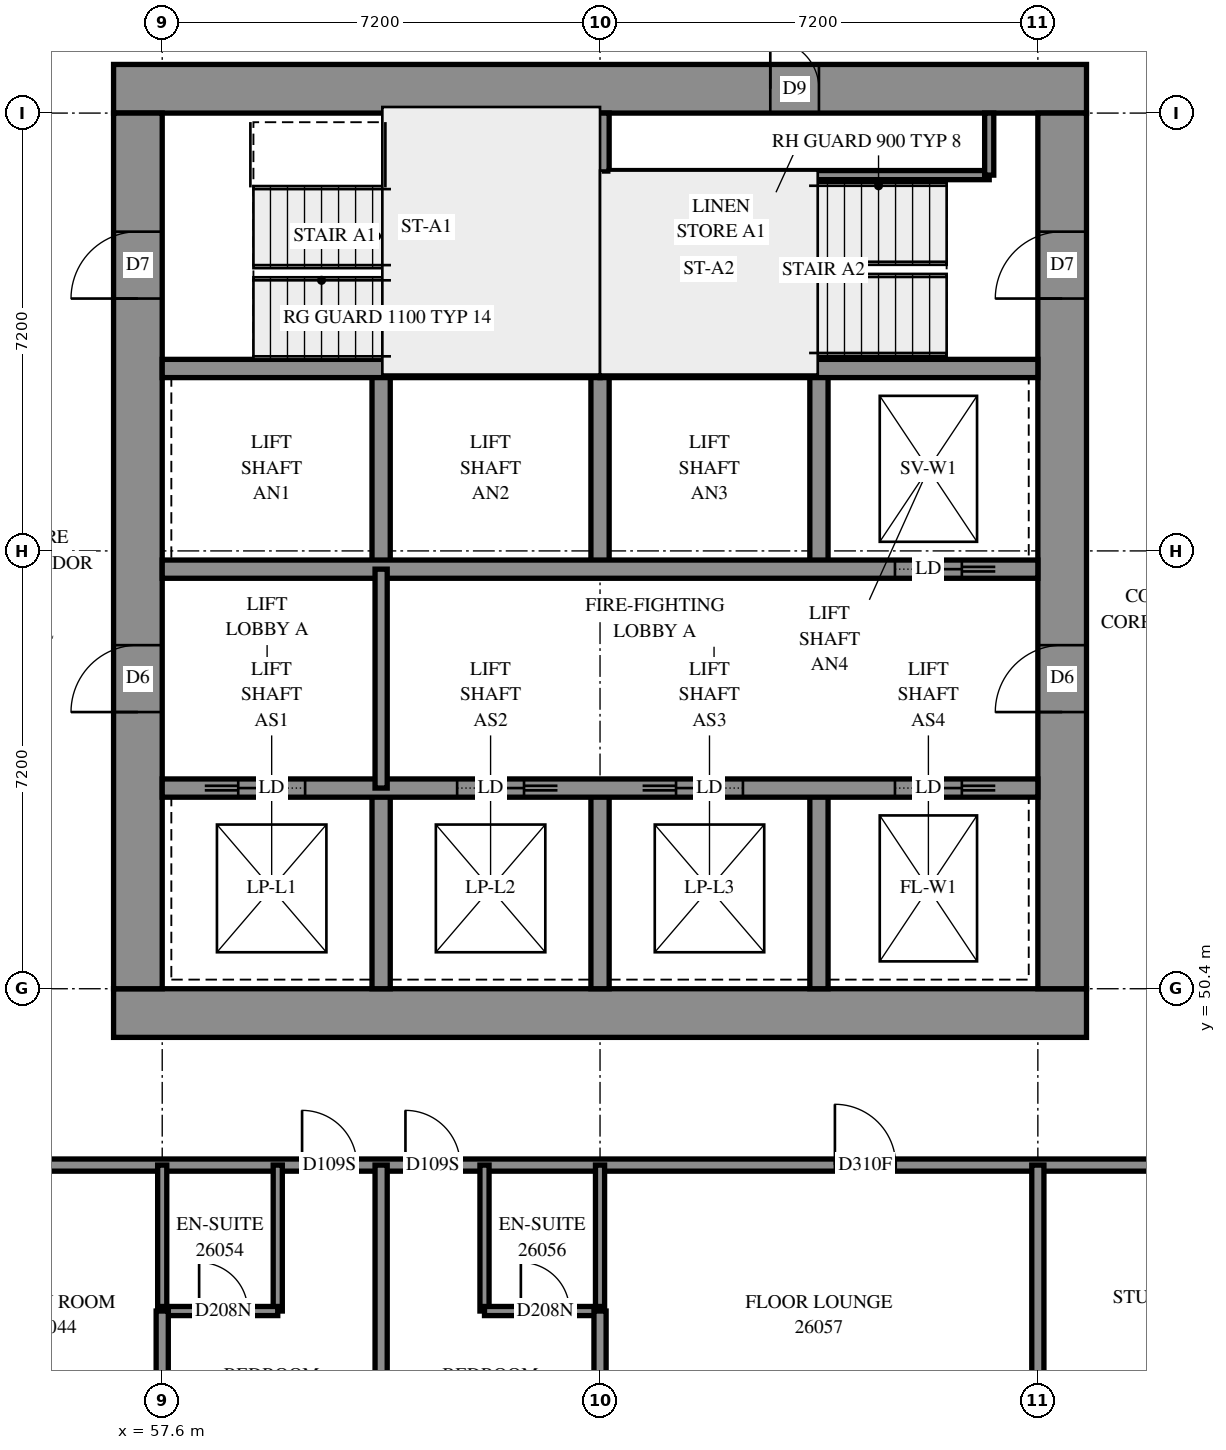
"""IFC4 building model, lengths in metres.
Left out: names, types, materials, properties, quantities, classifications, styles, units other than length and angle.
Written with IfcOpenShell. Run it as: python <this file> out.ifc"""

import sys

from ifc_helpers import new_model, si_unit, direction, frame, frame_2d, origin, place, context, subcontext, project, spatial, rectangle, extrude, element, fill, save


model = new_model("IFC4")
c1 = context("Model", 3, precision=1e-05, world=origin(), true_north=direction((0.0, 1.0)))
c2 = subcontext(c1, "Body", "Model", "MODEL_VIEW")
j1 = project(units=[si_unit("LENGTHUNIT", "METRE"), si_unit("PLANEANGLEUNIT", "RADIAN")], contexts=[c1])
p1 = place(None, origin())
s1 = spatial("IfcSite", under=j1, at=p1, CompositionType="ELEMENT")
p2 = place(p1, origin())
s2 = spatial("IfcBuilding", under=s1, at=p2, CompositionType="ELEMENT")
p3 = place(p2, frame((0.0, 0.0, 98.2)))
s3 = spatial("IfcBuildingStorey", under=s2, at=p3, CompositionType="ELEMENT", Elevation=98.2)
p4 = place(p3, frame((56.8, 50.0, -0.3), z_axis=(0.0, 0.0, 1.0), x_axis=(1.0, 0.0, 0.0)))
e1 = element("IfcWall", 1, at=p4, inside=s3, PredefinedType="SHEAR", context=c2, shape_type="SweptSolid", body=[
    extrude(rectangle(XDim=16.0, YDim=0.8, at=frame_2d((8.0, 0.0))), origin(), (0.0, 0.0, 1.0), 2.7),
])
p5 = place(p3, frame((56.8, 65.2, -0.3), z_axis=(0.0, 0.0, 1.0), x_axis=(1.0, 0.0, 0.0)))
e2 = element("IfcWall", 2, at=p5, inside=s3, PredefinedType="SHEAR", context=c2, shape_type="SweptSolid", body=[
    extrude(rectangle(XDim=16.0, YDim=0.8, at=frame_2d((8.0, 0.0))), origin(), (0.0, 0.0, 1.0), 2.7),
])
p6 = place(p5, frame((10.8, 0.0, 0.3)))
e3 = element("IfcOpeningElement", 3, at=p6, cuts=e2, PredefinedType="OPENING", context=c2, shape_type="SweptSolid", body=[
    extrude(rectangle(XDim=0.8, YDim=2.1, at=frame_2d((0.4, 1.05))), frame((0.0, 0.41, 0.0), z_axis=(0.0, -1.0, 0.0), x_axis=(1.0, 0.0, 0.0)), (0.0, 0.0, 1.0), 0.82),
])
p7 = place(p3, frame((57.2, 50.4, -0.3), z_axis=(0.0, 0.0, 1.0), x_axis=(0.0, 1.0, 0.0)))
e4 = element("IfcWall", 4, at=p7, inside=s3, PredefinedType="SHEAR", context=c2, shape_type="SweptSolid", body=[
    extrude(rectangle(XDim=14.4, YDim=0.8, at=frame_2d((7.2, 0.0))), origin(), (0.0, 0.0, 1.0), 2.7),
])
p8 = place(p7, frame((4.55, 0.0, 0.3)))
e5 = element("IfcOpeningElement", 5, at=p8, cuts=e4, PredefinedType="OPENING", context=c2, shape_type="SweptSolid", body=[
    extrude(rectangle(XDim=1.1, YDim=2.1, at=frame_2d((0.55, 1.05))), frame((0.0, 0.41, 0.0), z_axis=(0.0, -1.0, 0.0), x_axis=(1.0, 0.0, 0.0)), (0.0, 0.0, 1.0), 0.82),
])
p9 = place(p7, frame((11.35, 0.0, 0.3)))
e6 = element("IfcOpeningElement", 6, at=p9, cuts=e4, PredefinedType="OPENING", context=c2, shape_type="SweptSolid", body=[
    extrude(rectangle(XDim=1.1, YDim=2.1, at=frame_2d((0.55, 1.05))), frame((0.0, 0.41, 0.0), z_axis=(0.0, -1.0, 0.0), x_axis=(1.0, 0.0, 0.0)), (0.0, 0.0, 1.0), 0.82),
])
p10 = place(p3, frame((72.4, 50.4, -0.3), z_axis=(0.0, 0.0, 1.0), x_axis=(0.0, 1.0, 0.0)))
e7 = element("IfcWall", 7, at=p10, inside=s3, PredefinedType="SHEAR", context=c2, shape_type="SweptSolid", body=[
    extrude(rectangle(XDim=14.4, YDim=0.8, at=frame_2d((7.2, 0.0))), origin(), (0.0, 0.0, 1.0), 2.7),
])
p11 = place(p10, frame((4.55, 0.0, 0.3)))
e8 = element("IfcOpeningElement", 8, at=p11, cuts=e7, PredefinedType="OPENING", context=c2, shape_type="SweptSolid", body=[
    extrude(rectangle(XDim=1.1, YDim=2.1, at=frame_2d((0.55, 1.05))), frame((0.0, 0.41, 0.0), z_axis=(0.0, -1.0, 0.0), x_axis=(1.0, 0.0, 0.0)), (0.0, 0.0, 1.0), 0.82),
])
p12 = place(p10, frame((11.35, 0.0, 0.3)))
e9 = element("IfcOpeningElement", 9, at=p12, cuts=e7, PredefinedType="OPENING", context=c2, shape_type="SweptSolid", body=[
    extrude(rectangle(XDim=1.1, YDim=2.1, at=frame_2d((0.55, 1.05))), frame((0.0, 0.41, 0.0), z_axis=(0.0, -1.0, 0.0), x_axis=(1.0, 0.0, 0.0)), (0.0, 0.0, 1.0), 0.82),
])
for number, where, z_axis, x_axis in (
    (10, (61.2, 50.4, 0.0), (0.0, 0.0, 1.0), (0.0, 1.0, 0.0)),
    (11, (61.2, 57.3, 0.0), (0.0, 0.0, 1.0), (0.0, 1.0, 0.0)),
    (12, (64.8, 50.4, 0.0), (0.0, 0.0, 1.0), (0.0, 1.0, 0.0)),
    (13, (64.8, 57.3, 0.0), (0.0, 0.0, 1.0), (0.0, 1.0, 0.0)),
    (14, (68.4, 50.4, 0.0), (0.0, 0.0, 1.0), (0.0, 1.0, 0.0)),
    (15, (68.4, 57.3, 0.0), (0.0, 0.0, 1.0), (0.0, 1.0, 0.0)),
):
    element("IfcWall", number, at=place(p3, frame(where, z_axis=z_axis, x_axis=x_axis)), inside=s3, PredefinedType="SOLIDWALL", context=c2, shape_type="SweptSolid", body=[
        extrude(rectangle(XDim=3.3, YDim=0.3, at=frame_2d((1.65, 0.0))), origin(), (0.0, 0.0, 1.0), 3.1),
    ])
p13 = place(p3, frame((57.6, 53.7, 0.0), z_axis=(0.0, 0.0, 1.0), x_axis=(1.0, 0.0, 0.0)))
e16 = element("IfcWall", 16, at=p13, inside=s3, PredefinedType="SOLIDWALL", context=c2, shape_type="SweptSolid", body=[
    extrude(rectangle(XDim=14.4, YDim=0.3, at=frame_2d((7.2, 0.0))), origin(), (0.0, 0.0, 1.0), 3.1),
])
p14 = place(p13, frame((1.25, 0.0, 0.0)))
e17 = element("IfcOpeningElement", 17, at=p14, cuts=e16, PredefinedType="OPENING", context=c2, shape_type="SweptSolid", body=[
    extrude(rectangle(XDim=1.1, YDim=2.1, at=frame_2d((0.55, 1.05))), frame((0.0, 0.16, 0.0), z_axis=(0.0, -1.0, 0.0), x_axis=(1.0, 0.0, 0.0)), (0.0, 0.0, 1.0), 0.32),
])
p15 = place(p13, frame((4.85, 0.0, 0.0)))
e18 = element("IfcOpeningElement", 18, at=p15, cuts=e16, PredefinedType="OPENING", context=c2, shape_type="SweptSolid", body=[
    extrude(rectangle(XDim=1.1, YDim=2.1, at=frame_2d((0.55, 1.05))), frame((0.0, 0.16, 0.0), z_axis=(0.0, -1.0, 0.0), x_axis=(1.0, 0.0, 0.0)), (0.0, 0.0, 1.0), 0.32),
])
p16 = place(p13, frame((8.45, 0.0, 0.0)))
e19 = element("IfcOpeningElement", 19, at=p16, cuts=e16, PredefinedType="OPENING", context=c2, shape_type="SweptSolid", body=[
    extrude(rectangle(XDim=1.1, YDim=2.1, at=frame_2d((0.55, 1.05))), frame((0.0, 0.16, 0.0), z_axis=(0.0, -1.0, 0.0), x_axis=(1.0, 0.0, 0.0)), (0.0, 0.0, 1.0), 0.32),
])
p17 = place(p13, frame((12.05, 0.0, 0.0)))
e20 = element("IfcOpeningElement", 20, at=p17, cuts=e16, PredefinedType="OPENING", context=c2, shape_type="SweptSolid", body=[
    extrude(rectangle(XDim=1.1, YDim=2.1, at=frame_2d((0.55, 1.05))), frame((0.0, 0.16, 0.0), z_axis=(0.0, -1.0, 0.0), x_axis=(1.0, 0.0, 0.0)), (0.0, 0.0, 1.0), 0.32),
])
p18 = place(p3, frame((57.6, 57.3, 0.0), z_axis=(0.0, 0.0, 1.0), x_axis=(1.0, 0.0, 0.0)))
e21 = element("IfcWall", 21, at=p18, inside=s3, PredefinedType="SOLIDWALL", context=c2, shape_type="SweptSolid", body=[
    extrude(rectangle(XDim=14.4, YDim=0.3, at=frame_2d((7.2, 0.0))), origin(), (0.0, 0.0, 1.0), 3.1),
])
p19 = place(p18, frame((12.05, 0.0, 0.0)))
e22 = element("IfcOpeningElement", 22, at=p19, cuts=e21, PredefinedType="OPENING", context=c2, shape_type="SweptSolid", body=[
    extrude(rectangle(XDim=1.1, YDim=2.1, at=frame_2d((0.55, 1.05))), frame((0.0, 0.16, 0.0), z_axis=(0.0, -1.0, 0.0), x_axis=(1.0, 0.0, 0.0)), (0.0, 0.0, 1.0), 0.32),
])
for number, where, z_axis, x_axis in (
    (23, (57.6, 60.6, 0.0), (0.0, 0.0, 1.0), (1.0, 0.0, 0.0)),
    (24, (64.8, 60.6, 0.0), (0.0, 0.0, 1.0), (1.0, 0.0, 0.0)),
):
    element("IfcWall", number, at=place(p3, frame(where, z_axis=z_axis, x_axis=x_axis)), inside=s3, PredefinedType="SOLIDWALL", context=c2, shape_type="SweptSolid", body=[
        extrude(rectangle(XDim=7.2, YDim=0.3, at=frame_2d((3.6, 0.0))), origin(), (0.0, 0.0, 1.0), 3.1),
    ])
p20 = place(p3, frame((64.8, 60.6, 0.0), z_axis=(0.0, 0.0, 1.0), x_axis=(0.0, 1.0, 0.0)))
e25 = element("IfcWall", 25, at=p20, inside=s3, PredefinedType="SOLIDWALL", context=c2, shape_type="SweptSolid", body=[
    extrude(rectangle(XDim=4.2, YDim=0.3, at=frame_2d((2.1, 0.0))), origin(), (0.0, 0.0, 1.0), 3.1),
])
p21 = place(p3, frame((64.95, 63.78, 0.0), z_axis=(0.0, 0.0, 1.0), x_axis=(1.0, 0.0, 0.0)))
e26 = element("IfcWall", 26, at=p21, inside=s3, PredefinedType="PARTITIONING", context=c2, shape_type="SweptSolid", body=[
    extrude(rectangle(XDim=6.25, YDim=0.15, at=frame_2d((3.125, 0.0))), origin(), (0.0, 0.0, 1.0), 3.1),
])
p22 = place(p3, frame((71.2, 63.78, 0.0), z_axis=(0.0, 0.0, 1.0), x_axis=(0.0, 1.0, 0.0)))
e27 = element("IfcWall", 27, at=p22, inside=s3, PredefinedType="PARTITIONING", context=c2, shape_type="SweptSolid", body=[
    extrude(rectangle(XDim=1.02, YDim=0.15, at=frame_2d((0.51, 0.0))), origin(), (0.0, 0.0, 1.0), 3.1),
])
p23 = place(p3, frame((61.2, 53.7, 0.0), z_axis=(0.0, 0.0, 1.0), x_axis=(0.0, 1.0, 0.0)))
e28 = element("IfcWall", 28, at=p23, inside=s3, PredefinedType="PARTITIONING", context=c2, shape_type="SweptSolid", body=[
    extrude(rectangle(XDim=3.6, YDim=0.2, at=frame_2d((1.8, 0.0))), origin(), (0.0, 0.0, 1.0), 3.1),
])
p24 = place(p3, frame((54.7, 47.5, 0.0), z_axis=(0.0, 0.0, 1.0), x_axis=(1.0, 0.0, 0.0)))
e29 = element("IfcWall", 29, at=p24, inside=s3, PredefinedType="PARTITIONING", context=c2, shape_type="SweptSolid", body=[
    extrude(rectangle(XDim=19.442, YDim=0.2, at=frame_2d((9.721, 0.0))), origin(), (0.0, 0.0, 1.0), 3.1),
])
p25 = place(p24, frame((5.2, 0.0, 0.0)))
e30 = element("IfcOpeningElement", 30, at=p25, cuts=e29, PredefinedType="OPENING", context=c2, shape_type="SweptSolid", body=[
    extrude(rectangle(XDim=0.9, YDim=2.1, at=frame_2d((0.45, 1.05))), frame((0.0, 0.11, 0.0), z_axis=(0.0, -1.0, 0.0), x_axis=(1.0, 0.0, 0.0)), (0.0, 0.0, 1.0), 0.22),
])
p26 = place(p24, frame((6.9, 0.0, 0.0)))
e31 = element("IfcOpeningElement", 31, at=p26, cuts=e29, PredefinedType="OPENING", context=c2, shape_type="SweptSolid", body=[
    extrude(rectangle(XDim=0.9, YDim=2.1, at=frame_2d((0.45, 1.05))), frame((0.0, 0.11, 0.0), z_axis=(0.0, -1.0, 0.0), x_axis=(1.0, 0.0, 0.0)), (0.0, 0.0, 1.0), 0.22),
])
p27 = place(p24, frame((13.963, 0.0, 0.0)))
e32 = element("IfcOpeningElement", 32, at=p27, cuts=e29, PredefinedType="OPENING", context=c2, shape_type="SweptSolid", body=[
    extrude(rectangle(XDim=1.0, YDim=2.1, at=frame_2d((0.5, 1.05))), frame((0.0, 0.11, 0.0), z_axis=(0.0, -1.0, 0.0), x_axis=(1.0, 0.0, 0.0)), (0.0, 0.0, 1.0), 0.22),
])
p28 = place(p3, frame((61.2, 42.323, 0.0), z_axis=(0.0, 0.0, 1.0), x_axis=(0.0, 1.0, 0.0)))
e33 = element("IfcWall", 33, at=p28, inside=s3, PredefinedType="PARTITIONING", context=c2, shape_type="SweptSolid", body=[
    extrude(rectangle(XDim=5.177, YDim=0.2, at=frame_2d((2.588, 0.0))), origin(), (0.0, 0.0, 1.0), 3.1),
])
p29 = place(p3, frame((72.0, 43.7, 0.0), z_axis=(0.0, 0.0, 1.0), x_axis=(0.0, 1.0, 0.0)))
e34 = element("IfcWall", 34, at=p29, inside=s3, PredefinedType="PARTITIONING", context=c2, shape_type="SweptSolid", body=[
    extrude(rectangle(XDim=3.8, YDim=0.2, at=frame_2d((1.9, 0.0))), origin(), (0.0, 0.0, 1.0), 3.1),
])
for number, where, z_axis, x_axis in (
    (35, (59.5, 45.1, 0.0), (0.0, 0.0, 1.0), (0.0, 1.0, 0.0)),
    (36, (57.6, 45.1, 0.0), (0.0, 0.0, 1.0), (0.0, 1.0, 0.0)),
    (37, (62.9, 45.1, 0.0), (0.0, 0.0, 1.0), (0.0, 1.0, 0.0)),
    (38, (64.8, 45.1, 0.0), (0.0, 0.0, 1.0), (0.0, 1.0, 0.0)),
):
    element("IfcWall", number, at=place(p3, frame(where, z_axis=z_axis, x_axis=x_axis)), inside=s3, PredefinedType="PARTITIONING", context=c2, shape_type="SweptSolid", body=[
        extrude(rectangle(XDim=2.4, YDim=0.15, at=frame_2d((1.2, 0.0))), origin(), (0.0, 0.0, 1.0), 3.1),
    ])
p30 = place(p3, frame((57.6, 45.1, 0.0), z_axis=(0.0, 0.0, 1.0), x_axis=(1.0, 0.0, 0.0)))
e39 = element("IfcWall", 39, at=p30, inside=s3, PredefinedType="PARTITIONING", context=c2, shape_type="SweptSolid", body=[
    extrude(rectangle(XDim=1.9, YDim=0.15, at=frame_2d((0.95, 0.0))), origin(), (0.0, 0.0, 1.0), 3.1),
])
p31 = place(p30, frame((0.607, 0.0, 0.0)))
e40 = element("IfcOpeningElement", 40, at=p31, cuts=e39, PredefinedType="OPENING", context=c2, shape_type="SweptSolid", body=[
    extrude(rectangle(XDim=0.8, YDim=2.1, at=frame_2d((0.4, 1.05))), frame((0.0, 0.085, 0.0), z_axis=(0.0, -1.0, 0.0), x_axis=(1.0, 0.0, 0.0)), (0.0, 0.0, 1.0), 0.17),
])
p32 = place(p3, frame((62.9, 45.1, 0.0), z_axis=(0.0, 0.0, 1.0), x_axis=(1.0, 0.0, 0.0)))
e41 = element("IfcWall", 41, at=p32, inside=s3, PredefinedType="PARTITIONING", context=c2, shape_type="SweptSolid", body=[
    extrude(rectangle(XDim=1.9, YDim=0.15, at=frame_2d((0.95, 0.0))), origin(), (0.0, 0.0, 1.0), 3.1),
])
p33 = place(p32, frame((0.598, 0.0, 0.0)))
e42 = element("IfcOpeningElement", 42, at=p33, cuts=e41, PredefinedType="OPENING", context=c2, shape_type="SweptSolid", body=[
    extrude(rectangle(XDim=0.8, YDim=2.1, at=frame_2d((0.4, 1.05))), frame((0.0, 0.085, 0.0), z_axis=(0.0, -1.0, 0.0), x_axis=(1.0, 0.0, 0.0)), (0.0, 0.0, 1.0), 0.17),
])
for number, where, z_axis, x_axis in (
    (43, (57.6, 43.7, 0.0), (0.0, 0.0, 1.0), (0.0, 1.0, 0.0)),
    (44, (64.8, 43.7, 0.0), (0.0, 0.0, 1.0), (0.0, 1.0, 0.0)),
):
    element("IfcWall", number, at=place(p3, frame(where, z_axis=z_axis, x_axis=x_axis)), inside=s3, PredefinedType="PARTITIONING", context=c2, shape_type="SweptSolid", body=[
        extrude(rectangle(XDim=1.4, YDim=0.2, at=frame_2d((0.7, 0.0))), origin(), (0.0, 0.0, 1.0), 3.1),
    ])
p34 = place(p6, origin())
e45 = element("IfcDoor", 45, at=p34, inside=s3, OperationType="SINGLE_SWING_RIGHT", PredefinedType="DOOR", context=c2, shape_type="SweptSolid", body=[
    extrude(rectangle(XDim=0.8, YDim=2.1, at=frame_2d((0.4, 1.05))), frame((0.0, -0.34, 0.0), z_axis=(0.0, -1.0, 0.0), x_axis=(1.0, 0.0, 0.0)), (0.0, 0.0, 1.0), 0.05),
])
fill(e3, e45)
p35 = place(p8, origin())
e46 = element("IfcDoor", 46, at=p35, inside=s3, OperationType="DOUBLE_DOOR_SINGLE_SWING", PredefinedType="DOOR", context=c2, shape_type="SweptSolid", body=[
    extrude(rectangle(XDim=1.1, YDim=2.1, at=frame_2d((0.55, 1.05))), frame((0.0, 0.025, 0.0), z_axis=(0.0, -1.0, 0.0), x_axis=(1.0, 0.0, 0.0)), (0.0, 0.0, 1.0), 0.05),
])
fill(e5, e46)
p36 = place(p11, origin())
e47 = element("IfcDoor", 47, at=p36, inside=s3, OperationType="DOUBLE_DOOR_SINGLE_SWING", PredefinedType="DOOR", context=c2, shape_type="SweptSolid", body=[
    extrude(rectangle(XDim=1.1, YDim=2.1, at=frame_2d((0.55, 1.05))), frame((0.0, 0.025, 0.0), z_axis=(0.0, -1.0, 0.0), x_axis=(1.0, 0.0, 0.0)), (0.0, 0.0, 1.0), 0.05),
])
fill(e8, e47)
p37 = place(p9, origin())
e48 = element("IfcDoor", 48, at=p37, inside=s3, OperationType="SINGLE_SWING_LEFT", PredefinedType="DOOR", context=c2, shape_type="SweptSolid", body=[
    extrude(rectangle(XDim=1.1, YDim=2.1, at=frame_2d((0.55, 1.05))), frame((0.0, 0.025, 0.0), z_axis=(0.0, -1.0, 0.0), x_axis=(1.0, 0.0, 0.0)), (0.0, 0.0, 1.0), 0.05),
])
fill(e6, e48)
p38 = place(p12, origin())
e49 = element("IfcDoor", 49, at=p38, inside=s3, OperationType="SINGLE_SWING_RIGHT", PredefinedType="DOOR", context=c2, shape_type="SweptSolid", body=[
    extrude(rectangle(XDim=1.1, YDim=2.1, at=frame_2d((0.55, 1.05))), frame((0.0, 0.025, 0.0), z_axis=(0.0, -1.0, 0.0), x_axis=(1.0, 0.0, 0.0)), (0.0, 0.0, 1.0), 0.05),
])
fill(e9, e49)
p39 = place(p14, origin())
e50 = element("IfcDoor", 50, at=p39, inside=s3, OperationType="SLIDING_TO_LEFT", PredefinedType="DOOR", context=c2, shape_type="SweptSolid", body=[
    extrude(rectangle(XDim=1.1, YDim=2.1, at=frame_2d((0.55, 1.05))), frame((0.0, 0.025, 0.0), z_axis=(0.0, -1.0, 0.0), x_axis=(1.0, 0.0, 0.0)), (0.0, 0.0, 1.0), 0.05),
])
fill(e17, e50)
p40 = place(p15, origin())
e51 = element("IfcDoor", 51, at=p40, inside=s3, OperationType="SLIDING_TO_RIGHT", PredefinedType="DOOR", context=c2, shape_type="SweptSolid", body=[
    extrude(rectangle(XDim=1.1, YDim=2.1, at=frame_2d((0.55, 1.05))), frame((0.0, 0.025, 0.0), z_axis=(0.0, -1.0, 0.0), x_axis=(1.0, 0.0, 0.0)), (0.0, 0.0, 1.0), 0.05),
])
fill(e18, e51)
p41 = place(p16, origin())
e52 = element("IfcDoor", 52, at=p41, inside=s3, OperationType="SLIDING_TO_LEFT", PredefinedType="DOOR", context=c2, shape_type="SweptSolid", body=[
    extrude(rectangle(XDim=1.1, YDim=2.1, at=frame_2d((0.55, 1.05))), frame((0.0, 0.025, 0.0), z_axis=(0.0, -1.0, 0.0), x_axis=(1.0, 0.0, 0.0)), (0.0, 0.0, 1.0), 0.05),
])
fill(e19, e52)
p42 = place(p17, origin())
e53 = element("IfcDoor", 53, at=p42, inside=s3, OperationType="SLIDING_TO_RIGHT", PredefinedType="DOOR", context=c2, shape_type="SweptSolid", body=[
    extrude(rectangle(XDim=1.1, YDim=2.1, at=frame_2d((0.55, 1.05))), frame((0.0, 0.025, 0.0), z_axis=(0.0, -1.0, 0.0), x_axis=(1.0, 0.0, 0.0)), (0.0, 0.0, 1.0), 0.05),
])
fill(e20, e53)
p43 = place(p19, origin())
e54 = element("IfcDoor", 54, at=p43, inside=s3, OperationType="SLIDING_TO_RIGHT", PredefinedType="DOOR", context=c2, shape_type="SweptSolid", body=[
    extrude(rectangle(XDim=1.1, YDim=2.1, at=frame_2d((0.55, 1.05))), frame((0.0, 0.025, 0.0), z_axis=(0.0, -1.0, 0.0), x_axis=(1.0, 0.0, 0.0)), (0.0, 0.0, 1.0), 0.05),
])
fill(e22, e54)
p44 = place(p25, origin())
e55 = element("IfcDoor", 55, at=p44, inside=s3, OperationType="SINGLE_SWING_LEFT", PredefinedType="DOOR", context=c2, shape_type="SweptSolid", body=[
    extrude(rectangle(XDim=0.9, YDim=2.1, at=frame_2d((0.45, 1.05))), frame((0.0, 0.025, 0.0), z_axis=(0.0, -1.0, 0.0), x_axis=(1.0, 0.0, 0.0)), (0.0, 0.0, 1.0), 0.05),
])
fill(e30, e55)
p45 = place(p31, origin())
e56 = element("IfcDoor", 56, at=p45, inside=s3, OperationType="SINGLE_SWING_RIGHT", PredefinedType="DOOR", context=c2, shape_type="SweptSolid", body=[
    extrude(rectangle(XDim=0.8, YDim=2.1, at=frame_2d((0.4, 1.05))), frame((0.0, 0.025, 0.0), z_axis=(0.0, -1.0, 0.0), x_axis=(1.0, 0.0, 0.0)), (0.0, 0.0, 1.0), 0.05),
])
fill(e40, e56)
p46 = place(p26, origin())
e57 = element("IfcDoor", 57, at=p46, inside=s3, OperationType="SINGLE_SWING_RIGHT", PredefinedType="DOOR", context=c2, shape_type="SweptSolid", body=[
    extrude(rectangle(XDim=0.9, YDim=2.1, at=frame_2d((0.45, 1.05))), frame((0.0, 0.025, 0.0), z_axis=(0.0, -1.0, 0.0), x_axis=(1.0, 0.0, 0.0)), (0.0, 0.0, 1.0), 0.05),
])
fill(e31, e57)
p47 = place(p33, origin())
e58 = element("IfcDoor", 58, at=p47, inside=s3, OperationType="SINGLE_SWING_RIGHT", PredefinedType="DOOR", context=c2, shape_type="SweptSolid", body=[
    extrude(rectangle(XDim=0.8, YDim=2.1, at=frame_2d((0.4, 1.05))), frame((0.0, 0.025, 0.0), z_axis=(0.0, -1.0, 0.0), x_axis=(1.0, 0.0, 0.0)), (0.0, 0.0, 1.0), 0.05),
])
fill(e42, e58)
p48 = place(p27, origin())
e59 = element("IfcDoor", 59, at=p48, inside=s3, OperationType="SINGLE_SWING_LEFT", PredefinedType="DOOR", context=c2, shape_type="SweptSolid", body=[
    extrude(rectangle(XDim=1.0, YDim=2.1, at=frame_2d((0.5, 1.05))), frame((0.0, 0.025, 0.0), z_axis=(0.0, -1.0, 0.0), x_axis=(1.0, 0.0, 0.0)), (0.0, 0.0, 1.0), 0.05),
])
fill(e32, e59)
save(model, sys.argv[1])
